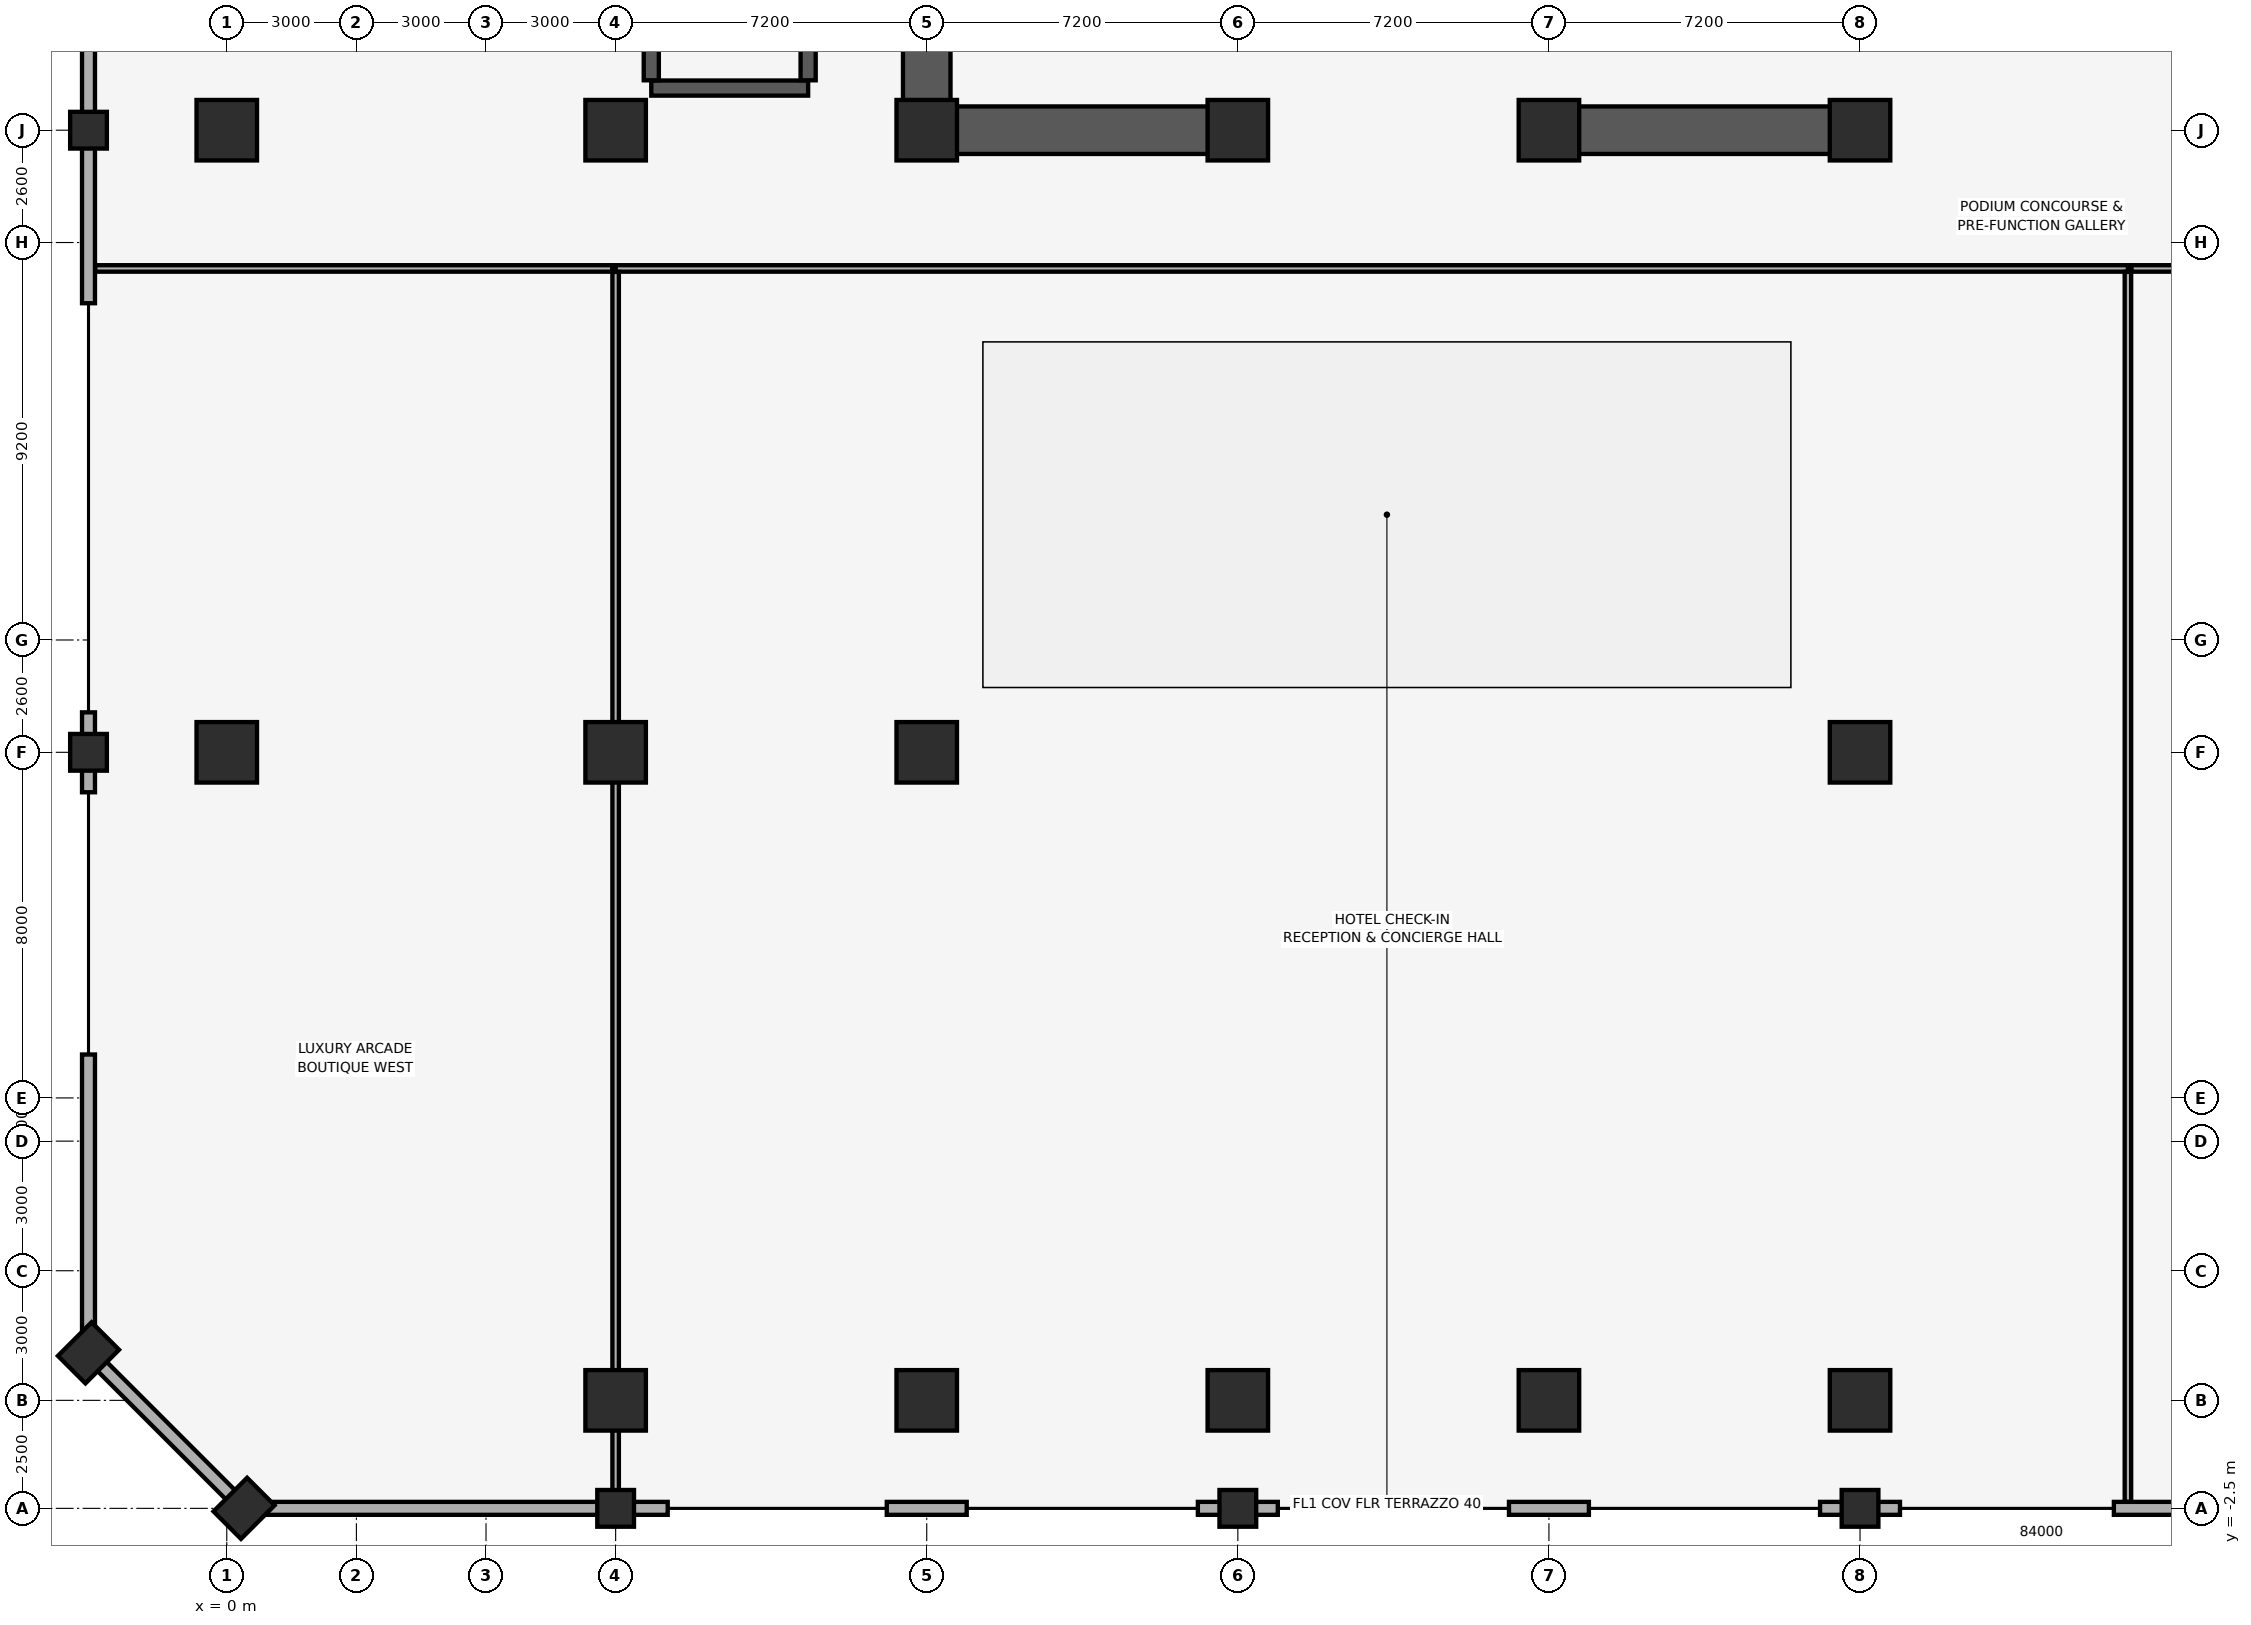
"""IFC4 building model, lengths in metres.
Left out: names, types, materials, properties, quantities, classifications, styles, units other than length and angle.
Written with IfcOpenShell. Run it as: python <this file> out.ifc"""

import sys

from ifc_helpers import new_model, si_unit, direction, frame, frame_2d, origin, origin_2d, place, context, subcontext, project, spatial, rectangle, extrude, element, fill, save


model = new_model("IFC4")
c1 = context("Model", 3, precision=1e-05, world=origin(), true_north=direction((0.0, 1.0)))
c2 = subcontext(c1, "Body", "Model", "MODEL_VIEW")
j1 = project(units=[si_unit("LENGTHUNIT", "METRE"), si_unit("PLANEANGLEUNIT", "RADIAN")], contexts=[c1])
p1 = place(None, origin())
s1 = spatial("IfcSite", under=j1, at=p1, CompositionType="ELEMENT")
p2 = place(p1, origin())
s2 = spatial("IfcBuilding", under=s1, at=p2, CompositionType="ELEMENT")
p3 = place(p2, frame((0.0, 0.0, 8.0)))
s3 = spatial("IfcBuildingStorey", under=s2, at=p3, CompositionType="ELEMENT", Elevation=8.0)
for number, where, z_axis, x_axis in (
    (1, (9.0, -2.5, 0.0), (0.0, 0.0, 1.0), (1.0, 0.0, 0.0)),
    (2, (23.4, -2.5, 0.0), (0.0, 0.0, 1.0), (1.0, 0.0, 0.0)),
    (3, (37.8, -2.5, 0.0), (0.0, 0.0, 1.0), (1.0, 0.0, 0.0)),
    (4, (-3.2, 15.0, 0.0), (0.0, 0.0, 1.0), (1.0, 0.0, 0.0)),
    (5, (-3.2, 29.4, 0.0), (0.0, 0.0, 1.0), (1.0, 0.0, 0.0)),
):
    element("IfcColumn", number, at=place(p3, frame(where, z_axis=z_axis, x_axis=x_axis)), inside=s3, PredefinedType="COLUMN", context=c2, shape_type="SweptSolid", body=[
        extrude(rectangle(XDim=0.85, YDim=0.85, at=origin_2d()), origin(), (0.0, 0.0, 1.0), 5.68),
    ])
for number, where, z_axis, x_axis in (
    (6, (0.4, -2.5, 0.0), (0.0, 0.0, 1.0), (0.707, 0.707, 0.0)),
    (7, (-3.2, 1.1, 0.0), (0.0, 0.0, 1.0), (0.707, 0.707, 0.0)),
):
    element("IfcColumn", number, at=place(p3, frame(where, z_axis=z_axis, x_axis=x_axis)), inside=s3, PredefinedType="PILASTER", context=c2, shape_type="SweptSolid", body=[
        extrude(rectangle(XDim=1.1, YDim=0.9, at=origin_2d()), origin(), (0.0, 0.0, 1.0), 5.68),
    ])
for number, where, z_axis, x_axis in (
    (8, (9.0, 0.0, 0.0), (0.0, 0.0, 1.0), (1.0, 0.0, 0.0)),
    (9, (9.0, 29.4, 0.0), (0.0, 0.0, 1.0), (1.0, 0.0, 0.0)),
    (10, (16.2, 0.0, 0.0), (0.0, 0.0, 1.0), (1.0, 0.0, 0.0)),
    (11, (16.2, 29.4, 0.0), (0.0, 0.0, 1.0), (1.0, 0.0, 0.0)),
    (12, (23.4, 0.0, 0.0), (0.0, 0.0, 1.0), (1.0, 0.0, 0.0)),
    (13, (23.4, 29.4, 0.0), (0.0, 0.0, 1.0), (1.0, 0.0, 0.0)),
    (14, (30.6, 0.0, 0.0), (0.0, 0.0, 1.0), (1.0, 0.0, 0.0)),
    (15, (30.6, 29.4, 0.0), (0.0, 0.0, 1.0), (1.0, 0.0, 0.0)),
    (16, (37.8, 0.0, 0.0), (0.0, 0.0, 1.0), (1.0, 0.0, 0.0)),
    (17, (37.8, 29.4, 0.0), (0.0, 0.0, 1.0), (1.0, 0.0, 0.0)),
    (18, (9.0, 15.0, 0.0), (0.0, 0.0, 1.0), (1.0, 0.0, 0.0)),
    (19, (37.8, 15.0, 0.0), (0.0, 0.0, 1.0), (1.0, 0.0, 0.0)),
    (20, (16.2, 15.0, 0.0), (0.0, 0.0, 1.0), (1.0, 0.0, 0.0)),
    (21, (0.0, 15.0, 0.0), (0.0, 0.0, 1.0), (1.0, 0.0, 0.0)),
    (22, (0.0, 29.4, 0.0), (0.0, 0.0, 1.0), (1.0, 0.0, 0.0)),
):
    element("IfcColumn", number, at=place(p3, frame(where, z_axis=z_axis, x_axis=x_axis)), inside=s3, PredefinedType="COLUMN", context=c2, shape_type="SweptSolid", body=[
        extrude(rectangle(XDim=1.4, YDim=1.4, at=origin_2d()), origin(), (0.0, 0.0, 1.0), 5.68),
    ])
p4 = place(p3, frame((0.4, -2.5, 0.0), z_axis=(0.0, 0.0, 1.0), x_axis=(1.0, 0.0, 0.0)))
e23 = element("IfcWall", 23, at=p4, inside=s3, PredefinedType="SOLIDWALL", context=c2, shape_type="SweptSolid", body=[
    extrude(rectangle(XDim=9.805, YDim=0.3, at=frame_2d((4.903, 0.0))), origin(), (0.0, 0.0, 1.0), 4.73),
])
p5 = place(p4, frame((1.475, 0.0, 0.85)))
e24 = element("IfcOpeningElement", 24, at=p5, cuts=e23, PredefinedType="OPENING", context=c2, shape_type="SweptSolid", body=[
    extrude(rectangle(XDim=5.4, YDim=2.4, at=frame_2d((2.7, 1.2))), frame((0.0, 0.16, 0.0), z_axis=(0.0, -1.0, 0.0), x_axis=(1.0, 0.0, 0.0)), (0.0, 0.0, 1.0), 0.32),
])
p6 = place(p3, frame((15.275, -2.5, 0.0), z_axis=(0.0, 0.0, 1.0), x_axis=(1.0, 0.0, 0.0)))
e25 = element("IfcWall", 25, at=p6, inside=s3, PredefinedType="SOLIDWALL", context=c2, shape_type="SweptSolid", body=[
    extrude(rectangle(XDim=1.85, YDim=0.3, at=frame_2d((0.925, 0.0))), origin(), (0.0, 0.0, 1.0), 4.73),
])
for number, where, z_axis, x_axis in (
    (26, (22.475, -2.5, 0.0), (0.0, 0.0, 1.0), (1.0, 0.0, 0.0)),
    (27, (29.675, -2.5, 0.0), (0.0, 0.0, 1.0), (1.0, 0.0, 0.0)),
):
    element("IfcWall", number, at=place(p3, frame(where, z_axis=z_axis, x_axis=x_axis)), inside=s3, PredefinedType="SOLIDWALL", context=c2, shape_type="SweptSolid", body=[
        extrude(rectangle(XDim=1.85, YDim=0.3, at=frame_2d((0.925, 0.0))), origin(), (0.0, 0.0, 1.0), 4.73),
    ])
p7 = place(p3, frame((36.875, -2.5, 0.0), z_axis=(0.0, 0.0, 1.0), x_axis=(1.0, 0.0, 0.0)))
e28 = element("IfcWall", 28, at=p7, inside=s3, PredefinedType="SOLIDWALL", context=c2, shape_type="SweptSolid", body=[
    extrude(rectangle(XDim=1.85, YDim=0.3, at=frame_2d((0.925, 0.0))), origin(), (0.0, 0.0, 1.0), 4.73),
])
p8 = place(p3, frame((43.675, -2.5, 0.0), z_axis=(0.0, 0.0, 1.0), x_axis=(1.0, 0.0, 0.0)))
e29 = element("IfcWall", 29, at=p8, inside=s3, PredefinedType="SOLIDWALL", context=c2, shape_type="SweptSolid", body=[
    extrude(rectangle(XDim=3.45, YDim=0.3, at=frame_2d((1.725, 0.0))), origin(), (0.0, 0.0, 1.0), 4.73),
])
p9 = place(p3, frame((-3.2, 48.9, 0.0), z_axis=(0.0, 0.0, 1.0), x_axis=(0.0, -1.0, 0.0)))
e30 = element("IfcWall", 30, at=p9, inside=s3, PredefinedType="SOLIDWALL", context=c2, shape_type="SweptSolid", body=[
    extrude(rectangle(XDim=23.505, YDim=0.3, at=frame_2d((11.752, 0.0))), origin(), (0.0, 0.0, 1.0), 4.73),
])
p10 = place(p9, frame((12.5, 0.0, 0.85)))
e31 = element("IfcOpeningElement", 31, at=p10, cuts=e30, PredefinedType="OPENING", context=c2, shape_type="SweptSolid", body=[
    extrude(rectangle(XDim=3.8, YDim=2.2, at=frame_2d((1.9, 1.1))), frame((0.0, 0.16, 0.0), z_axis=(0.0, -1.0, 0.0), x_axis=(1.0, 0.0, 0.0)), (0.0, 0.0, 1.0), 0.32),
])
p11 = place(p9, frame((4.2, 0.0, 0.85)))
e32 = element("IfcOpeningElement", 32, at=p11, cuts=e30, PredefinedType="OPENING", context=c2, shape_type="SweptSolid", body=[
    extrude(rectangle(XDim=3.8, YDim=2.2, at=frame_2d((1.9, 1.1))), frame((0.0, 0.16, 0.0), z_axis=(0.0, -1.0, 0.0), x_axis=(1.0, 0.0, 0.0)), (0.0, 0.0, 1.0), 0.32),
])
p12 = place(p3, frame((-3.2, 15.925, 0.0), z_axis=(0.0, 0.0, 1.0), x_axis=(0.0, -1.0, 0.0)))
e33 = element("IfcWall", 33, at=p12, inside=s3, PredefinedType="SOLIDWALL", context=c2, shape_type="SweptSolid", body=[
    extrude(rectangle(XDim=1.85, YDim=0.3, at=frame_2d((0.925, 0.0))), origin(), (0.0, 0.0, 1.0), 4.73),
])
p13 = place(p3, frame((-3.2, 8.005, 0.0), z_axis=(0.0, 0.0, 1.0), x_axis=(0.0, -1.0, 0.0)))
e34 = element("IfcWall", 34, at=p13, inside=s3, PredefinedType="SOLIDWALL", context=c2, shape_type="SweptSolid", body=[
    extrude(rectangle(XDim=6.905, YDim=0.3, at=frame_2d((3.452, 0.0))), origin(), (0.0, 0.0, 1.0), 4.73),
])
p14 = place(p13, frame((2.18, 0.0, 0.85)))
e35 = element("IfcOpeningElement", 35, at=p14, cuts=e34, PredefinedType="OPENING", context=c2, shape_type="SweptSolid", body=[
    extrude(rectangle(XDim=3.8, YDim=2.2, at=frame_2d((1.9, 1.1))), frame((0.0, 0.16, 0.0), z_axis=(0.0, -1.0, 0.0), x_axis=(1.0, 0.0, 0.0)), (0.0, 0.0, 1.0), 0.32),
])
p15 = place(p3, frame((-3.2, 1.1, 0.0), z_axis=(0.0, 0.0, 1.0), x_axis=(0.707082803744, -0.707130757816, 0.0)))
e36 = element("IfcWall", 36, at=p15, inside=s3, PredefinedType="SOLIDWALL", context=c2, shape_type="SweptSolid", body=[
    extrude(rectangle(XDim=5.091, YDim=0.3, at=frame_2d((2.545, 0.0))), origin(), (0.0, 0.0, 1.0), 4.73),
])
p16 = place(p15, frame((1.496, 0.0, 0.85)))
e37 = element("IfcOpeningElement", 37, at=p16, cuts=e36, PredefinedType="OPENING", context=c2, shape_type="SweptSolid", body=[
    extrude(rectangle(XDim=2.1, YDim=1.6, at=frame_2d((1.05, 0.8))), frame((0.0, 0.16, 0.0), z_axis=(0.0, -1.0, 0.0), x_axis=(1.0, 0.0, 0.0)), (0.0, 0.0, 1.0), 0.32),
])
p17 = place(p3, frame((16.2, 29.4, 0.0), z_axis=(0.0, 0.0, 1.0), x_axis=(0.0, 1.0, 0.0)))
e38 = element("IfcWall", 38, at=p17, inside=s3, PredefinedType="SHEAR", context=c2, shape_type="SweptSolid", body=[
    extrude(rectangle(XDim=19.2, YDim=1.1, at=frame_2d((9.6, 0.0))), origin(), (0.0, 0.0, 1.0), 5.68),
])
p18 = place(p3, frame((16.755, 29.4, 0.0), z_axis=(0.0, 0.0, 1.0), x_axis=(1.0, 0.0, 0.0)))
e39 = element("IfcWall", 39, at=p18, inside=s3, PredefinedType="SHEAR", context=c2, shape_type="SweptSolid", body=[
    extrude(rectangle(XDim=6.845, YDim=1.1, at=frame_2d((3.423, 0.0))), origin(), (0.0, 0.0, 1.0), 5.68),
])
p19 = place(p3, frame((30.4, 29.4, 0.0), z_axis=(0.0, 0.0, 1.0), x_axis=(1.0, 0.0, 0.0)))
e40 = element("IfcWall", 40, at=p19, inside=s3, PredefinedType="SHEAR", context=c2, shape_type="SweptSolid", body=[
    extrude(rectangle(XDim=7.6, YDim=1.1, at=frame_2d((3.8, 0.0))), origin(), (0.0, 0.0, 1.0), 5.68),
])
p20 = place(p3, frame((9.825, 30.375, 0.0), z_axis=(0.0, 0.0, 1.0), x_axis=(1.0, 0.0, 0.0)))
e41 = element("IfcWall", 41, at=p20, inside=s3, PredefinedType="SHEAR", context=c2, shape_type="SweptSolid", body=[
    extrude(rectangle(XDim=3.63, YDim=0.35, at=frame_2d((1.815, 0.0))), origin(), (0.0, 0.0, 1.0), 5.68),
])
p21 = place(p20, frame((1.24, 0.0, 0.0)))
e42 = element("IfcOpeningElement", 42, at=p21, cuts=e41, PredefinedType="OPENING", context=c2, shape_type="SweptSolid", body=[
    extrude(rectangle(XDim=1.15, YDim=2.15, at=frame_2d((0.575, 1.075))), frame((0.0, 0.185, 0.0), z_axis=(0.0, -1.0, 0.0), x_axis=(1.0, 0.0, 0.0)), (0.0, 0.0, 1.0), 0.37),
])
for number, where, z_axis, x_axis in (
    (43, (9.825, 30.555, 0.0), (0.0, 0.0, 1.0), (0.0, 1.0, 0.0)),
    (44, (13.455, 30.555, 0.0), (0.0, 0.0, 1.0), (0.0, 1.0, 0.0)),
):
    element("IfcWall", number, at=place(p3, frame(where, z_axis=z_axis, x_axis=x_axis)), inside=s3, PredefinedType="SHEAR", context=c2, shape_type="SweptSolid", body=[
        extrude(rectangle(XDim=8.44, YDim=0.35, at=frame_2d((4.22, 0.0))), origin(), (0.0, 0.0, 1.0), 5.68),
    ])
p22 = place(p3, frame((9.0, 26.2, 0.0), z_axis=(0.0, 0.0, 1.0), x_axis=(1.0, 0.0, 0.0)))
e45 = element("IfcWall", 45, at=p22, inside=s3, PredefinedType="PARTITIONING", context=c2, shape_type="SweptSolid", body=[
    extrude(rectangle(XDim=35.0, YDim=0.15, at=frame_2d((17.5, 0.0))), origin(), (0.0, 0.0, 1.0), 5.68),
])
p23 = place(p22, frame((17.25, 0.0, 0.0)))
e46 = element("IfcOpeningElement", 46, at=p23, cuts=e45, PredefinedType="OPENING", context=c2, shape_type="SweptSolid", body=[
    extrude(rectangle(XDim=1.5, YDim=2.25, at=frame_2d((0.75, 1.125))), frame((0.0, 0.085, 0.0), z_axis=(0.0, -1.0, 0.0), x_axis=(1.0, 0.0, 0.0)), (0.0, 0.0, 1.0), 0.17),
])
p24 = place(p3, frame((9.0, -2.345, 0.0), z_axis=(0.0, 0.0, 1.0), x_axis=(0.0, 1.0, 0.0)))
e47 = element("IfcWall", 47, at=p24, inside=s3, PredefinedType="PARTITIONING", context=c2, shape_type="SweptSolid", body=[
    extrude(rectangle(XDim=28.465, YDim=0.15, at=frame_2d((14.232, 0.0))), origin(), (0.0, 0.0, 1.0), 4.992),
])
p25 = place(p3, frame((44.0, -2.345, 0.0), z_axis=(0.0, 0.0, 1.0), x_axis=(0.0, 1.0, 0.0)))
e48 = element("IfcWall", 48, at=p25, inside=s3, PredefinedType="PARTITIONING", context=c2, shape_type="SweptSolid", body=[
    extrude(rectangle(XDim=28.465, YDim=0.15, at=frame_2d((14.232, 0.0))), origin(), (0.0, 0.0, 1.0), 5.68),
])
p26 = place(p3, frame((44.08, 26.2, 0.0), z_axis=(0.0, 0.0, 1.0), x_axis=(1.0, 0.0, 0.0)))
e49 = element("IfcWall", 49, at=p26, inside=s3, PredefinedType="PARTITIONING", context=c2, shape_type="SweptSolid", body=[
    extrude(rectangle(XDim=27.92, YDim=0.15, at=frame_2d((13.96, 0.0))), origin(), (0.0, 0.0, 1.0), 5.68),
])
p27 = place(p26, frame((13.17, 0.0, 0.0)))
e50 = element("IfcOpeningElement", 50, at=p27, cuts=e49, PredefinedType="OPENING", context=c2, shape_type="SweptSolid", body=[
    extrude(rectangle(XDim=1.5, YDim=2.25, at=frame_2d((0.75, 1.125))), frame((0.0, 0.085, 0.0), z_axis=(0.0, -1.0, 0.0), x_axis=(1.0, 0.0, 0.0)), (0.0, 0.0, 1.0), 0.17),
])
p28 = place(p3, frame((-3.045, 26.2, 0.0), z_axis=(0.0, 0.0, 1.0), x_axis=(1.0, 0.0, 0.0)))
e51 = element("IfcWall", 51, at=p28, inside=s3, PredefinedType="PARTITIONING", context=c2, shape_type="SweptSolid", body=[
    extrude(rectangle(XDim=11.965, YDim=0.15, at=frame_2d((5.982, 0.0))), origin(), (0.0, 0.0, 1.0), 5.68),
])
p29 = place(p28, frame((5.795, 0.0, 0.0)))
e52 = element("IfcOpeningElement", 52, at=p29, cuts=e51, PredefinedType="OPENING", context=c2, shape_type="SweptSolid", body=[
    extrude(rectangle(XDim=1.5, YDim=2.25, at=frame_2d((0.75, 1.125))), frame((0.0, 0.085, 0.0), z_axis=(0.0, -1.0, 0.0), x_axis=(1.0, 0.0, 0.0)), (0.0, 0.0, 1.0), 0.17),
])
p30 = place(p16, origin())
e53 = element("IfcWindow", 53, at=p30, inside=s3, PartitioningType="SINGLE_PANEL", PredefinedType="WINDOW", context=c2, shape_type="SweptSolid", body=[
    extrude(rectangle(XDim=2.1, YDim=1.6, at=frame_2d((1.05, 0.8))), frame((0.0, 0.03, 0.0), z_axis=(0.0, -1.0, 0.0), x_axis=(1.0, 0.0, 0.0)), (0.0, 0.0, 1.0), 0.06),
])
fill(e37, e53)
p31 = place(p5, origin())
e54 = element("IfcWindow", 54, at=p31, inside=s3, PartitioningType="SINGLE_PANEL", PredefinedType="WINDOW", context=c2, shape_type="SweptSolid", body=[
    extrude(rectangle(XDim=5.4, YDim=2.4, at=frame_2d((2.7, 1.2))), frame((0.0, 0.03, 0.0), z_axis=(0.0, -1.0, 0.0), x_axis=(1.0, 0.0, 0.0)), (0.0, 0.0, 1.0), 0.06),
])
fill(e24, e54)
p32 = place(p14, origin())
e55 = element("IfcWindow", 55, at=p32, inside=s3, PartitioningType="SINGLE_PANEL", PredefinedType="WINDOW", context=c2, shape_type="SweptSolid", body=[
    extrude(rectangle(XDim=3.8, YDim=2.2, at=frame_2d((1.9, 1.1))), frame((0.0, 0.03, 0.0), z_axis=(0.0, -1.0, 0.0), x_axis=(1.0, 0.0, 0.0)), (0.0, 0.0, 1.0), 0.06),
])
fill(e35, e55)
p33 = place(p21, origin())
e56 = element("IfcDoor", 56, at=p33, inside=s3, OperationType="SINGLE_SWING_RIGHT", PredefinedType="DOOR", context=c2, shape_type="SweptSolid", body=[
    extrude(rectangle(XDim=1.15, YDim=2.15, at=frame_2d((0.575, 1.075))), frame((0.0, 0.025, 0.0), z_axis=(0.0, -1.0, 0.0), x_axis=(1.0, 0.0, 0.0)), (0.0, 0.0, 1.0), 0.05),
])
fill(e42, e56)
p34 = place(p23, origin())
e57 = element("IfcDoor", 57, at=p34, inside=s3, OperationType="DOUBLE_DOOR_SINGLE_SWING", PredefinedType="DOOR", context=c2, shape_type="SweptSolid", body=[
    extrude(rectangle(XDim=1.5, YDim=2.25, at=frame_2d((0.75, 1.125))), frame((0.0, 0.025, 0.0), z_axis=(0.0, -1.0, 0.0), x_axis=(1.0, 0.0, 0.0)), (0.0, 0.0, 1.0), 0.05),
])
fill(e46, e57)
p35 = place(p29, origin())
e58 = element("IfcDoor", 58, at=p35, inside=s3, OperationType="DOUBLE_DOOR_SINGLE_SWING", PredefinedType="DOOR", context=c2, shape_type="SweptSolid", body=[
    extrude(rectangle(XDim=1.5, YDim=2.25, at=frame_2d((0.75, 1.125))), frame((0.0, 0.025, 0.0), z_axis=(0.0, -1.0, 0.0), x_axis=(1.0, 0.0, 0.0)), (0.0, 0.0, 1.0), 0.05),
])
fill(e52, e58)
save(model, sys.argv[1])
